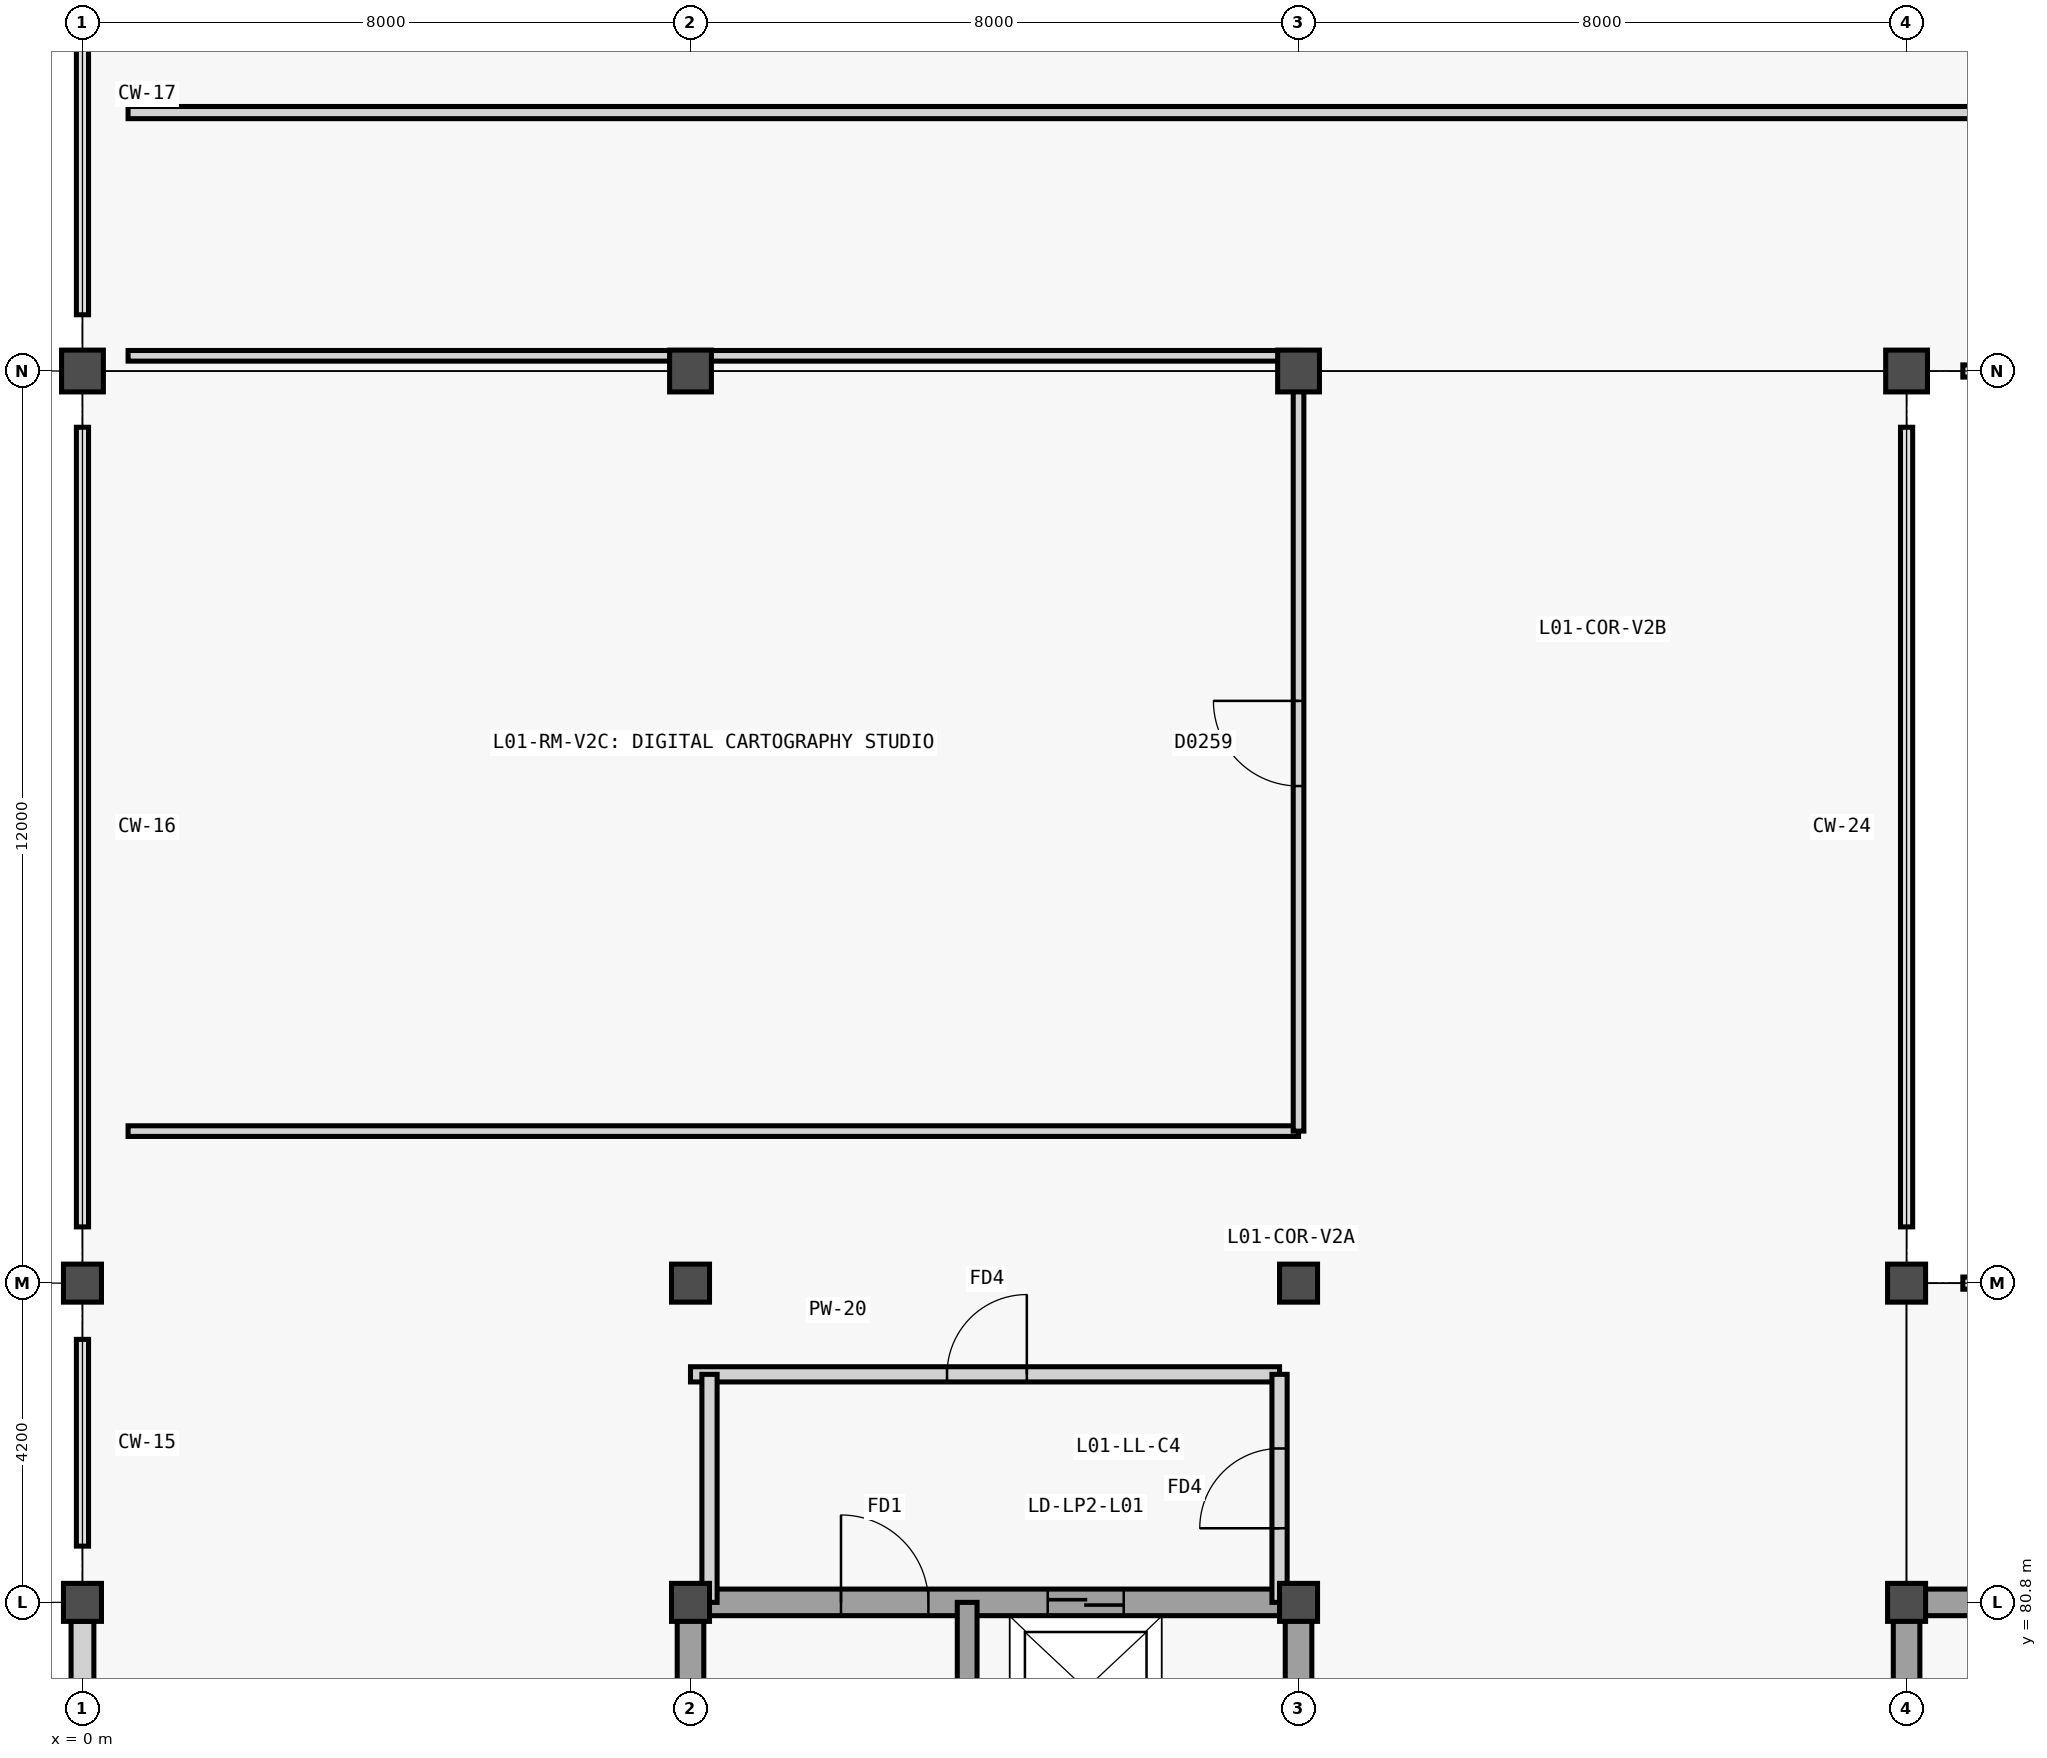
"""IFC4 building model, lengths in metres.
Left out: names, types, materials, properties, quantities, classifications, styles, units other than length and angle.
Written with IfcOpenShell. Run it as: python <this file> out.ifc"""

import sys

from ifc_helpers import new_model, si_unit, direction, frame, frame_2d, origin, origin_2d, place, context, subcontext, project, spatial, rectangle, extrude, element, fill, save


model = new_model("IFC4")
c1 = context("Model", 3, precision=1e-05, world=origin(), true_north=direction((0.0, 1.0)))
c2 = subcontext(c1, "Body", "Model", "MODEL_VIEW")
j1 = project(units=[si_unit("LENGTHUNIT", "METRE"), si_unit("PLANEANGLEUNIT", "RADIAN")], contexts=[c1])
p1 = place(None, origin())
s1 = spatial("IfcSite", under=j1, at=p1, CompositionType="ELEMENT")
p2 = place(p1, origin())
s2 = spatial("IfcBuilding", under=s1, at=p2, CompositionType="ELEMENT")
p3 = place(p2, frame((0.0, 0.0, 5.4)))
s3 = spatial("IfcBuildingStorey", under=s2, at=p3, CompositionType="ELEMENT", Elevation=5.4)
for number, where, z_axis, x_axis in (
    (1, (0.0, 80.8, 0.0), (0.0, 0.0, 1.0), (1.0, 0.0, 0.0)),
    (2, (0.0, 85.0, 0.0), (0.0, 0.0, 1.0), (1.0, 0.0, 0.0)),
):
    element("IfcColumn", number, at=place(p3, frame(where, z_axis=z_axis, x_axis=x_axis)), inside=s3, PredefinedType="COLUMN", context=c2, shape_type="SweptSolid", body=[
        extrude(rectangle(XDim=0.5, YDim=0.5, at=origin_2d()), origin(), (0.0, 0.0, 1.0), 4.8),
    ])
p4 = place(p3, frame((0.0, 97.0, 0.0), z_axis=(0.0, 0.0, 1.0), x_axis=(1.0, 0.0, 0.0)))
e3 = element("IfcColumn", 3, at=p4, inside=s3, PredefinedType="COLUMN", context=c2, shape_type="SweptSolid", body=[
    extrude(rectangle(XDim=0.55, YDim=0.55, at=origin_2d()), origin(), (0.0, 0.0, 1.0), 4.8),
])
for number, where, z_axis, x_axis in (
    (4, (8.0, 80.8, 0.0), (0.0, 0.0, 1.0), (1.0, 0.0, 0.0)),
    (5, (8.0, 85.0, 0.0), (0.0, 0.0, 1.0), (1.0, 0.0, 0.0)),
):
    element("IfcColumn", number, at=place(p3, frame(where, z_axis=z_axis, x_axis=x_axis)), inside=s3, PredefinedType="COLUMN", context=c2, shape_type="SweptSolid", body=[
        extrude(rectangle(XDim=0.5, YDim=0.5, at=origin_2d()), origin(), (0.0, 0.0, 1.0), 4.8),
    ])
p5 = place(p3, frame((8.0, 97.0, 0.0), z_axis=(0.0, 0.0, 1.0), x_axis=(1.0, 0.0, 0.0)))
e6 = element("IfcColumn", 6, at=p5, inside=s3, PredefinedType="COLUMN", context=c2, shape_type="SweptSolid", body=[
    extrude(rectangle(XDim=0.55, YDim=0.55, at=origin_2d()), origin(), (0.0, 0.0, 1.0), 4.8),
])
for number, where, z_axis, x_axis in (
    (7, (16.0, 80.8, 0.0), (0.0, 0.0, 1.0), (1.0, 0.0, 0.0)),
    (8, (16.0, 85.0, 0.0), (0.0, 0.0, 1.0), (1.0, 0.0, 0.0)),
):
    element("IfcColumn", number, at=place(p3, frame(where, z_axis=z_axis, x_axis=x_axis)), inside=s3, PredefinedType="COLUMN", context=c2, shape_type="SweptSolid", body=[
        extrude(rectangle(XDim=0.5, YDim=0.5, at=origin_2d()), origin(), (0.0, 0.0, 1.0), 4.8),
    ])
p6 = place(p3, frame((16.0, 97.0, 0.0), z_axis=(0.0, 0.0, 1.0), x_axis=(1.0, 0.0, 0.0)))
e9 = element("IfcColumn", 9, at=p6, inside=s3, PredefinedType="COLUMN", context=c2, shape_type="SweptSolid", body=[
    extrude(rectangle(XDim=0.55, YDim=0.55, at=origin_2d()), origin(), (0.0, 0.0, 1.0), 4.8),
])
for number, where, z_axis, x_axis in (
    (10, (24.0, 80.8, 0.0), (0.0, 0.0, 1.0), (1.0, 0.0, 0.0)),
    (11, (24.0, 85.0, 0.0), (0.0, 0.0, 1.0), (1.0, 0.0, 0.0)),
):
    element("IfcColumn", number, at=place(p3, frame(where, z_axis=z_axis, x_axis=x_axis)), inside=s3, PredefinedType="COLUMN", context=c2, shape_type="SweptSolid", body=[
        extrude(rectangle(XDim=0.5, YDim=0.5, at=origin_2d()), origin(), (0.0, 0.0, 1.0), 4.8),
    ])
p7 = place(p3, frame((24.0, 97.0, 0.0), z_axis=(0.0, 0.0, 1.0), x_axis=(1.0, 0.0, 0.0)))
e12 = element("IfcColumn", 12, at=p7, inside=s3, PredefinedType="COLUMN", context=c2, shape_type="SweptSolid", body=[
    extrude(rectangle(XDim=0.55, YDim=0.55, at=origin_2d()), origin(), (0.0, 0.0, 1.0), 4.8),
])
p8 = place(p3, frame((0.0, 72.648, 0.0), z_axis=(0.0, 0.0, 1.0), x_axis=(0.0, 1.0, 0.0)))
e13 = element("IfcWall", 13, at=p8, inside=s3, PredefinedType="SOLIDWALL", context=c2, shape_type="SweptSolid", body=[
    extrude(rectangle(XDim=7.904, YDim=0.3, at=frame_2d((3.952, 0.0))), origin(), (0.0, 0.0, 1.0), 3.94),
])
p9 = place(p8, frame((1.932, 0.0, 0.9)))
e14 = element("IfcOpeningElement", 14, at=p9, cuts=e13, PredefinedType="OPENING", context=c2, shape_type="SweptSolid", body=[
    extrude(rectangle(XDim=1.8, YDim=1.55, at=frame_2d((0.9, 0.775))), frame((0.0, 0.16, 0.0), z_axis=(0.0, -1.0, 0.0), x_axis=(1.0, 0.0, 0.0)), (0.0, 0.0, 1.0), 0.32),
])
for number, where, z_axis, x_axis in (
    (15, (8.0, 72.4, 0.0), (0.0, 0.0, 1.0), (0.0, 1.0, 0.0)),
    (16, (16.0, 72.4, 0.0), (0.0, 0.0, 1.0), (0.0, 1.0, 0.0)),
):
    element("IfcWall", number, at=place(p3, frame(where, z_axis=z_axis, x_axis=x_axis)), inside=s3, PredefinedType="SHEAR", context=c2, shape_type="SweptSolid", body=[
        extrude(rectangle(XDim=8.4, YDim=0.35, at=frame_2d((4.2, 0.0))), origin(), (0.0, 0.0, 1.0), 4.8),
    ])
p10 = place(p3, frame((8.0, 80.8, 0.0), z_axis=(0.0, 0.0, 1.0), x_axis=(1.0, 0.0, 0.0)))
e17 = element("IfcWall", 17, at=p10, inside=s3, PredefinedType="SHEAR", context=c2, shape_type="SweptSolid", body=[
    extrude(rectangle(XDim=8.0, YDim=0.35, at=frame_2d((4.0, 0.0))), origin(), (0.0, 0.0, 1.0), 4.8),
])
p11 = place(p10, frame((1.98, 0.0, 0.0)))
e18 = element("IfcOpeningElement", 18, at=p11, cuts=e17, PredefinedType="OPENING", context=c2, shape_type="SweptSolid", body=[
    extrude(rectangle(XDim=1.15, YDim=2.2, at=frame_2d((0.575, 1.1))), frame((0.0, 0.185, 0.0), z_axis=(0.0, -1.0, 0.0), x_axis=(1.0, 0.0, 0.0)), (0.0, 0.0, 1.0), 0.37),
])
p12 = place(p10, frame((4.7, 0.0, 0.0)))
e19 = element("IfcOpeningElement", 19, at=p12, cuts=e17, PredefinedType="OPENING", context=c2, shape_type="SweptSolid", body=[
    extrude(rectangle(XDim=1.0, YDim=2.15, at=frame_2d((0.5, 1.075))), frame((0.0, 0.185, 0.0), z_axis=(0.0, -1.0, 0.0), x_axis=(1.0, 0.0, 0.0)), (0.0, 0.0, 1.0), 0.37),
])
p13 = place(p3, frame((11.64, 72.4, 0.0), z_axis=(0.0, 0.0, 1.0), x_axis=(0.0, 1.0, 0.0)))
e20 = element("IfcWall", 20, at=p13, inside=s3, PredefinedType="SHEAR", context=c2, shape_type="SweptSolid", body=[
    extrude(rectangle(XDim=8.4, YDim=0.26, at=frame_2d((4.2, 0.0))), origin(), (0.0, 0.0, 1.0), 4.8),
])
p14 = place(p3, frame((8.0, 83.8, 0.0), z_axis=(0.0, 0.0, 1.0), x_axis=(1.0, 0.0, 0.0)))
e21 = element("IfcWall", 21, at=p14, inside=s3, PredefinedType="PARTITIONING", context=c2, shape_type="SweptSolid", body=[
    extrude(rectangle(XDim=7.75, YDim=0.2, at=frame_2d((3.875, 0.0))), origin(), (0.0, 0.0, 1.0), 4.52),
])
p15 = place(p14, frame((3.375, 0.0, 0.0)))
e22 = element("IfcOpeningElement", 22, at=p15, cuts=e21, PredefinedType="OPENING", context=c2, shape_type="SweptSolid", body=[
    extrude(rectangle(XDim=1.05, YDim=2.15, at=frame_2d((0.525, 1.075))), frame((0.0, 0.11, 0.0), z_axis=(0.0, -1.0, 0.0), x_axis=(1.0, 0.0, 0.0)), (0.0, 0.0, 1.0), 0.22),
])
p16 = place(p3, frame((15.75, 80.8, 0.0), z_axis=(0.0, 0.0, 1.0), x_axis=(0.0, 1.0, 0.0)))
e23 = element("IfcWall", 23, at=p16, inside=s3, PredefinedType="PARTITIONING", context=c2, shape_type="SweptSolid", body=[
    extrude(rectangle(XDim=3.0, YDim=0.2, at=frame_2d((1.5, 0.0))), origin(), (0.0, 0.0, 1.0), 3.94),
])
p17 = place(p16, frame((0.975, 0.0, 0.0)))
e24 = element("IfcOpeningElement", 24, at=p17, cuts=e23, PredefinedType="OPENING", context=c2, shape_type="SweptSolid", body=[
    extrude(rectangle(XDim=1.05, YDim=2.15, at=frame_2d((0.525, 1.075))), frame((0.0, 0.11, 0.0), z_axis=(0.0, -1.0, 0.0), x_axis=(1.0, 0.0, 0.0)), (0.0, 0.0, 1.0), 0.22),
])
p18 = place(p3, frame((8.25, 80.8, 0.0), z_axis=(0.0, 0.0, 1.0), x_axis=(0.0, 1.0, 0.0)))
e25 = element("IfcWall", 25, at=p18, inside=s3, PredefinedType="PARTITIONING", context=c2, shape_type="SweptSolid", body=[
    extrude(rectangle(XDim=3.0, YDim=0.2, at=frame_2d((1.5, 0.0))), origin(), (0.0, 0.0, 1.0), 3.94),
])
p19 = place(p3, frame((24.0, 72.4, 0.0), z_axis=(0.0, 0.0, 1.0), x_axis=(0.0, 1.0, 0.0)))
e26 = element("IfcWall", 26, at=p19, inside=s3, PredefinedType="SHEAR", context=c2, shape_type="SweptSolid", body=[
    extrude(rectangle(XDim=8.4, YDim=0.35, at=frame_2d((4.2, 0.0))), origin(), (0.0, 0.0, 1.0), 4.8),
])
p20 = place(p3, frame((24.0, 80.8, 0.0), z_axis=(0.0, 0.0, 1.0), x_axis=(1.0, 0.0, 0.0)))
e27 = element("IfcWall", 27, at=p20, inside=s3, PredefinedType="SHEAR", context=c2, shape_type="SweptSolid", body=[
    extrude(rectangle(XDim=8.0, YDim=0.35, at=frame_2d((4.0, 0.0))), origin(), (0.0, 0.0, 1.0), 4.8),
])
p21 = place(p20, frame((2.04, 0.0, 0.0)))
e28 = element("IfcOpeningElement", 28, at=p21, cuts=e27, PredefinedType="OPENING", context=c2, shape_type="SweptSolid", body=[
    extrude(rectangle(XDim=1.15, YDim=2.2, at=frame_2d((0.575, 1.1))), frame((0.0, 0.185, 0.0), z_axis=(0.0, -1.0, 0.0), x_axis=(1.0, 0.0, 0.0)), (0.0, 0.0, 1.0), 0.37),
])
p22 = place(p3, frame((0.6, 100.4, 0.0), z_axis=(0.0, 0.0, 1.0), x_axis=(1.0, 0.0, 0.0)))
e29 = element("IfcWall", 29, at=p22, inside=s3, PredefinedType="PARTITIONING", context=c2, shape_type="SweptSolid", body=[
    extrude(rectangle(XDim=37.4, YDim=0.16, at=frame_2d((18.7, 0.0))), origin(), (0.0, 0.0, 1.0), 4.54),
])
p23 = place(p22, frame((29.45, 0.0, 0.0)))
e30 = element("IfcOpeningElement", 30, at=p23, cuts=e29, PredefinedType="OPENING", context=c2, shape_type="SweptSolid", body=[
    extrude(rectangle(XDim=1.9, YDim=2.3, at=frame_2d((0.95, 1.15))), frame((0.0, 0.09, 0.0), z_axis=(0.0, -1.0, 0.0), x_axis=(1.0, 0.0, 0.0)), (0.0, 0.0, 1.0), 0.18),
])
p24 = place(p3, frame((0.6, 87.0, 0.0), z_axis=(0.0, 0.0, 1.0), x_axis=(1.0, 0.0, 0.0)))
e31 = element("IfcWall", 31, at=p24, inside=s3, PredefinedType="PARTITIONING", context=c2, shape_type="SweptSolid", body=[
    extrude(rectangle(XDim=15.4, YDim=0.14, at=frame_2d((7.7, 0.0))), origin(), (0.0, 0.0, 1.0), 4.54),
])
p25 = place(p3, frame((0.6, 97.2, 0.0), z_axis=(0.0, 0.0, 1.0), x_axis=(1.0, 0.0, 0.0)))
e32 = element("IfcWall", 32, at=p25, inside=s3, PredefinedType="PARTITIONING", context=c2, shape_type="SweptSolid", body=[
    extrude(rectangle(XDim=15.4, YDim=0.14, at=frame_2d((7.7, 0.0))), origin(), (0.0, 0.0, 1.0), 3.86),
])
p26 = place(p3, frame((16.0, 87.0, 0.0), z_axis=(0.0, 0.0, 1.0), x_axis=(0.0, 1.0, 0.0)))
e33 = element("IfcWall", 33, at=p26, inside=s3, PredefinedType="PARTITIONING", context=c2, shape_type="SweptSolid", body=[
    extrude(rectangle(XDim=10.2, YDim=0.14, at=frame_2d((5.1, 0.0))), origin(), (0.0, 0.0, 1.0), 3.89),
])
p27 = place(p26, frame((4.54, 0.0, 0.0)))
e34 = element("IfcOpeningElement", 34, at=p27, cuts=e33, PredefinedType="OPENING", context=c2, shape_type="SweptSolid", body=[
    extrude(rectangle(XDim=1.12, YDim=2.15, at=frame_2d((0.56, 1.075))), frame((0.0, 0.08, 0.0), z_axis=(0.0, -1.0, 0.0), x_axis=(1.0, 0.0, 0.0)), (0.0, 0.0, 1.0), 0.16),
])
p28 = place(p11, origin())
e35 = element("IfcDoor", 35, at=p28, inside=s3, OperationType="SINGLE_SWING_LEFT", PredefinedType="DOOR", context=c2, shape_type="SweptSolid", body=[
    extrude(rectangle(XDim=1.15, YDim=2.2, at=frame_2d((0.575, 1.1))), frame((0.0, 0.025, 0.0), z_axis=(0.0, -1.0, 0.0), x_axis=(1.0, 0.0, 0.0)), (0.0, 0.0, 1.0), 0.05),
])
fill(e18, e35)
p29 = place(p12, origin())
e36 = element("IfcDoor", 36, at=p29, inside=s3, OperationType="DOUBLE_DOOR_SLIDING", PredefinedType="DOOR", context=c2, shape_type="SweptSolid", body=[
    extrude(rectangle(XDim=1.0, YDim=2.15, at=frame_2d((0.5, 1.075))), frame((0.0, 0.025, 0.0), z_axis=(0.0, -1.0, 0.0), x_axis=(1.0, 0.0, 0.0)), (0.0, 0.0, 1.0), 0.05),
])
fill(e19, e36)
p30 = place(p15, origin())
e37 = element("IfcDoor", 37, at=p30, inside=s3, OperationType="SINGLE_SWING_RIGHT", PredefinedType="DOOR", context=c2, shape_type="SweptSolid", body=[
    extrude(rectangle(XDim=1.05, YDim=2.15, at=frame_2d((0.525, 1.075))), frame((0.0, 0.025, 0.0), z_axis=(0.0, -1.0, 0.0), x_axis=(1.0, 0.0, 0.0)), (0.0, 0.0, 1.0), 0.05),
])
fill(e22, e37)
p31 = place(p17, origin())
e38 = element("IfcDoor", 38, at=p31, inside=s3, OperationType="SINGLE_SWING_LEFT", PredefinedType="DOOR", context=c2, shape_type="SweptSolid", body=[
    extrude(rectangle(XDim=1.05, YDim=2.15, at=frame_2d((0.525, 1.075))), frame((0.0, 0.025, 0.0), z_axis=(0.0, -1.0, 0.0), x_axis=(1.0, 0.0, 0.0)), (0.0, 0.0, 1.0), 0.05),
])
fill(e24, e38)
p32 = place(p27, origin())
e39 = element("IfcDoor", 39, at=p32, inside=s3, OperationType="SINGLE_SWING_RIGHT", PredefinedType="DOOR", context=c2, shape_type="SweptSolid", body=[
    extrude(rectangle(XDim=1.12, YDim=2.15, at=frame_2d((0.56, 1.075))), frame((0.0, 0.025, 0.0), z_axis=(0.0, -1.0, 0.0), x_axis=(1.0, 0.0, 0.0)), (0.0, 0.0, 1.0), 0.05),
])
fill(e34, e39)
save(model, sys.argv[1])
